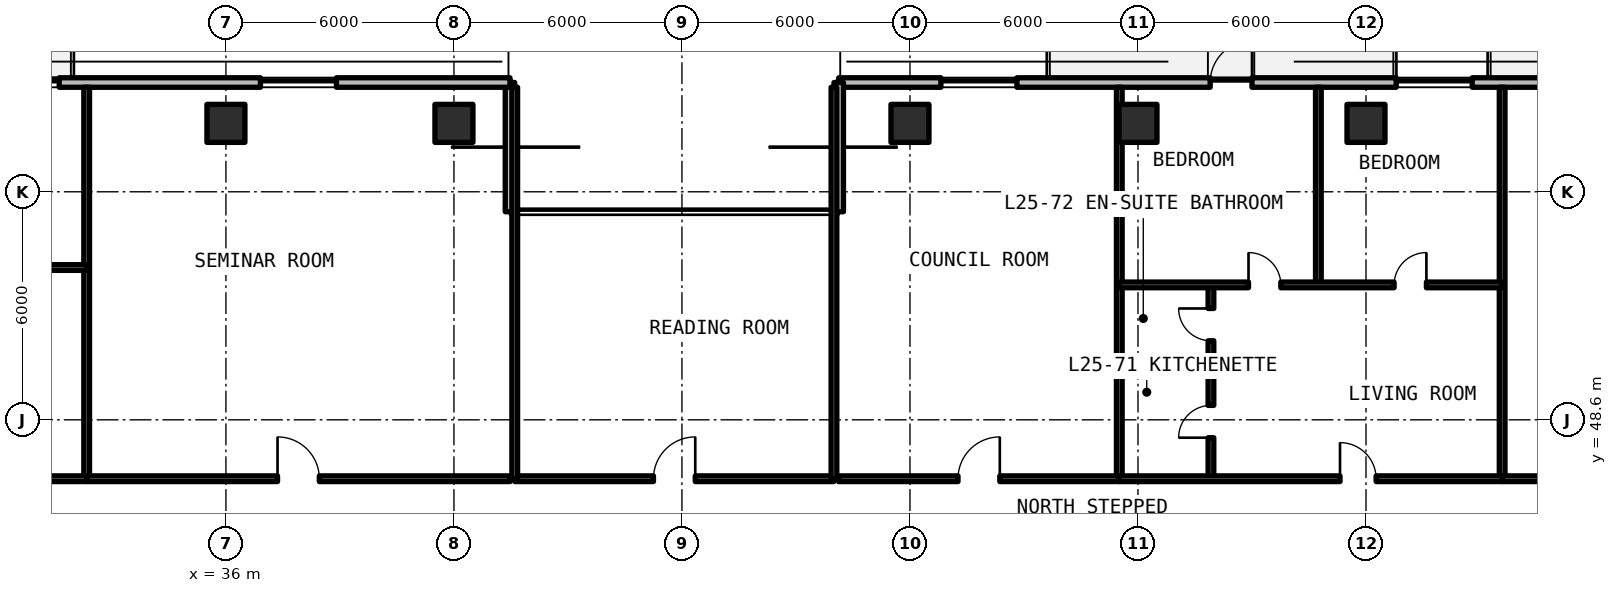
"""IFC4 building model, lengths in metres.
Left out: names, types, materials, properties, quantities, classifications, styles, units other than length and angle.
Written with IfcOpenShell. Run it as: python <this file> out.ifc"""

import sys

from ifc_helpers import new_model, si_unit, direction, frame, frame_2d, origin, origin_2d, place, context, subcontext, project, spatial, rectangle, extrude, element, fill, save


model = new_model("IFC4")
c1 = context("Model", 3, precision=1e-05, world=origin(), true_north=direction((0.0, 1.0)))
c2 = subcontext(c1, "Body", "Model", "MODEL_VIEW")
j1 = project(units=[si_unit("LENGTHUNIT", "METRE"), si_unit("PLANEANGLEUNIT", "RADIAN")], contexts=[c1])
p1 = place(None, origin())
s1 = spatial("IfcSite", under=j1, at=p1, CompositionType="ELEMENT")
p2 = place(p1, origin())
s2 = spatial("IfcBuilding", under=s1, at=p2, CompositionType="ELEMENT")
p3 = place(p2, frame((0.0, 0.0, 92.07)))
s3 = spatial("IfcBuildingStorey", under=s2, at=p3, CompositionType="ELEMENT", Elevation=92.07)
for number, where, z_axis, x_axis in (
    (1, (36.0, 56.4, 0.0), (0.0, 0.0, 1.0), (1.0, 0.0, 0.0)),
    (2, (42.0, 56.4, 0.0), (0.0, 0.0, 1.0), (1.0, 0.0, 0.0)),
    (3, (54.0, 56.4, 0.0), (0.0, 0.0, 1.0), (1.0, 0.0, 0.0)),
    (4, (60.0, 56.4, 0.0), (0.0, 0.0, 1.0), (1.0, 0.0, 0.0)),
    (5, (66.0, 56.4, 0.0), (0.0, 0.0, 1.0), (1.0, 0.0, 0.0)),
):
    element("IfcColumn", number, at=place(p3, frame(where, z_axis=z_axis, x_axis=x_axis)), inside=s3, PredefinedType="COLUMN", context=c2, shape_type="SweptSolid", body=[
        extrude(rectangle(XDim=1.0, YDim=1.0, at=origin_2d()), origin(), (0.0, 0.0, 1.0), 3.3),
    ])
p4 = place(p3, frame((96.148, 57.475, 0.0), z_axis=(0.0, 0.0, 1.0), x_axis=(-1.0, 0.0, 0.0)))
e6 = element("IfcWall", 6, at=p4, inside=s3, PredefinedType="SOLIDWALL", context=c2, shape_type="SweptSolid", body=[
    extrude(rectangle(XDim=44.023, YDim=0.25, at=frame_2d((22.012, 0.0))), origin(), (0.0, 0.0, 1.0), 3.08),
])
p5 = place(p4, frame((33.148, 0.0, 0.0)))
e7 = element("IfcOpeningElement", 7, at=p5, cuts=e6, PredefinedType="OPENING", context=c2, shape_type="SweptSolid", body=[
    extrude(rectangle(XDim=1.1, YDim=2.15, at=frame_2d((0.55, 1.075))), frame((0.0, 0.135, 0.0), z_axis=(0.0, -1.0, 0.0), x_axis=(1.0, 0.0, 0.0)), (0.0, 0.0, 1.0), 0.27),
])
p6 = place(p4, frame((21.298, 0.0, 0.0)))
e8 = element("IfcOpeningElement", 8, at=p6, cuts=e6, PredefinedType="OPENING", context=c2, shape_type="SweptSolid", body=[
    extrude(rectangle(XDim=1.1, YDim=2.15, at=frame_2d((0.55, 1.075))), frame((0.0, 0.135, 0.0), z_axis=(0.0, -1.0, 0.0), x_axis=(1.0, 0.0, 0.0)), (0.0, 0.0, 1.0), 0.27),
])
p7 = place(p4, frame((9.198, 0.0, 0.0)))
e9 = element("IfcOpeningElement", 9, at=p7, cuts=e6, PredefinedType="OPENING", context=c2, shape_type="SweptSolid", body=[
    extrude(rectangle(XDim=1.1, YDim=2.15, at=frame_2d((0.55, 1.075))), frame((0.0, 0.135, 0.0), z_axis=(0.0, -1.0, 0.0), x_axis=(1.0, 0.0, 0.0)), (0.0, 0.0, 1.0), 0.27),
])
p8 = place(p4, frame((39.334, 0.0, 0.78)))
e10 = element("IfcOpeningElement", 10, at=p8, cuts=e6, PredefinedType="OPENING", context=c2, shape_type="SweptSolid", body=[
    extrude(rectangle(XDim=2.0, YDim=1.66, at=frame_2d((1.0, 0.83))), frame((0.0, 0.135, 0.0), z_axis=(0.0, -1.0, 0.0), x_axis=(1.0, 0.0, 0.0)), (0.0, 0.0, 1.0), 0.27),
])
p9 = place(p4, frame((27.354, 0.0, 0.78)))
e11 = element("IfcOpeningElement", 11, at=p9, cuts=e6, PredefinedType="OPENING", context=c2, shape_type="SweptSolid", body=[
    extrude(rectangle(XDim=2.0, YDim=1.66, at=frame_2d((1.0, 0.83))), frame((0.0, 0.135, 0.0), z_axis=(0.0, -1.0, 0.0), x_axis=(1.0, 0.0, 0.0)), (0.0, 0.0, 1.0), 0.27),
])
p10 = place(p4, frame((14.76, 0.0, 0.78)))
e12 = element("IfcOpeningElement", 12, at=p10, cuts=e6, PredefinedType="OPENING", context=c2, shape_type="SweptSolid", body=[
    extrude(rectangle(XDim=2.0, YDim=1.66, at=frame_2d((1.0, 0.83))), frame((0.0, 0.135, 0.0), z_axis=(0.0, -1.0, 0.0), x_axis=(1.0, 0.0, 0.0)), (0.0, 0.0, 1.0), 0.27),
])
p11 = place(p4, frame((3.066, 0.0, 0.78)))
e13 = element("IfcOpeningElement", 13, at=p11, cuts=e6, PredefinedType="OPENING", context=c2, shape_type="SweptSolid", body=[
    extrude(rectangle(XDim=2.0, YDim=1.66, at=frame_2d((1.0, 0.83))), frame((0.0, 0.135, 0.0), z_axis=(0.0, -1.0, 0.0), x_axis=(1.0, 0.0, 0.0)), (0.0, 0.0, 1.0), 0.27),
])
for number, where, z_axis, x_axis in (
    (14, (52.125, 57.475, 0.0), (0.0, 0.0, 1.0), (0.0, -1.0, 0.0)),
    (15, (43.475, 54.075, 0.0), (0.0, 0.0, 1.0), (0.0, 1.0, 0.0)),
):
    element("IfcWall", number, at=place(p3, frame(where, z_axis=z_axis, x_axis=x_axis)), inside=s3, PredefinedType="SOLIDWALL", context=c2, shape_type="SweptSolid", body=[
        extrude(rectangle(XDim=3.4, YDim=0.25, at=frame_2d((1.7, 0.0))), origin(), (0.0, 0.0, 1.0), 3.08),
    ])
p12 = place(p3, frame((43.475, 57.475, 0.0), z_axis=(0.0, 0.0, 1.0), x_axis=(-1.0, 0.0, 0.0)))
e16 = element("IfcWall", 16, at=p12, inside=s3, PredefinedType="SOLIDWALL", context=c2, shape_type="SweptSolid", body=[
    extrude(rectangle(XDim=22.023, YDim=0.25, at=frame_2d((11.012, 0.0))), origin(), (0.0, 0.0, 1.0), 3.08),
])
p13 = place(p12, frame((16.275, 0.0, 0.0)))
e17 = element("IfcOpeningElement", 17, at=p13, cuts=e16, PredefinedType="OPENING", context=c2, shape_type="SweptSolid", body=[
    extrude(rectangle(XDim=1.1, YDim=2.15, at=frame_2d((0.55, 1.075))), frame((0.0, 0.135, 0.0), z_axis=(0.0, -1.0, 0.0), x_axis=(1.0, 0.0, 0.0)), (0.0, 0.0, 1.0), 0.27),
])
p14 = place(p12, frame((11.862, 0.0, 0.78)))
e18 = element("IfcOpeningElement", 18, at=p14, cuts=e16, PredefinedType="OPENING", context=c2, shape_type="SweptSolid", body=[
    extrude(rectangle(XDim=0.85, YDim=1.65, at=frame_2d((0.425, 0.825))), frame((0.0, 0.135, 0.0), z_axis=(0.0, -1.0, 0.0), x_axis=(1.0, 0.0, 0.0)), (0.0, 0.0, 1.0), 0.27),
])
p15 = place(p12, frame((4.567, 0.0, 0.78)))
e19 = element("IfcOpeningElement", 19, at=p15, cuts=e16, PredefinedType="OPENING", context=c2, shape_type="SweptSolid", body=[
    extrude(rectangle(XDim=2.0, YDim=1.66, at=frame_2d((1.0, 0.83))), frame((0.0, 0.135, 0.0), z_axis=(0.0, -1.0, 0.0), x_axis=(1.0, 0.0, 0.0)), (0.0, 0.0, 1.0), 0.27),
])
p16 = place(p3, frame((43.6, 47.05, 0.0), z_axis=(0.0, 0.0, 1.0), x_axis=(1.0, 0.0, 0.0)))
e20 = element("IfcWall", 20, at=p16, inside=s3, PredefinedType="SOLIDWALL", context=c2, shape_type="SweptSolid", body=[
    extrude(rectangle(XDim=8.4, YDim=0.15, at=frame_2d((4.2, 0.0))), origin(), (0.0, 0.0, 1.0), 2.35),
])
p17 = place(p16, frame((3.65, 0.0, 0.0)))
e21 = element("IfcOpeningElement", 21, at=p17, cuts=e20, PredefinedType="OPENING", context=c2, shape_type="SweptSolid", body=[
    extrude(rectangle(XDim=1.1, YDim=2.15, at=frame_2d((0.55, 1.075))), frame((0.0, 0.085, 0.0), z_axis=(0.0, -1.0, 0.0), x_axis=(1.0, 0.0, 0.0)), (0.0, 0.0, 1.0), 0.17),
])
for number, where, z_axis, x_axis in (
    (22, (43.6, 47.05, 0.0), (0.0, 0.0, 1.0), (0.0, 1.0, 0.0)),
    (23, (52.0, 47.05, 0.0), (0.0, 0.0, 1.0), (0.0, 1.0, 0.0)),
    (24, (32.336, 47.05, 0.0), (0.0, 0.0, 1.0), (0.0, 1.0, 0.0)),
):
    element("IfcWall", number, at=place(p3, frame(where, z_axis=z_axis, x_axis=x_axis)), inside=s3, PredefinedType="SOLIDWALL", context=c2, shape_type="SweptSolid", body=[
        extrude(rectangle(XDim=10.3, YDim=0.15, at=frame_2d((5.15, 0.0))), origin(), (0.0, 0.0, 1.0), 2.35),
    ])
p18 = place(p3, frame((21.6, 52.607, 0.0), z_axis=(0.0, 0.0, 1.0), x_axis=(1.0, 0.0, 0.0)))
e25 = element("IfcWall", 25, at=p18, inside=s3, PredefinedType="PARTITIONING", context=c2, shape_type="SweptSolid", body=[
    extrude(rectangle(XDim=10.736, YDim=0.15, at=frame_2d((5.368, 0.0))), origin(), (0.0, 0.0, 1.0), 2.35),
])
p19 = place(p18, frame((4.845, 0.0, 0.0)))
e26 = element("IfcOpeningElement", 26, at=p19, cuts=e25, PredefinedType="OPENING", context=c2, shape_type="SweptSolid", body=[
    extrude(rectangle(XDim=0.85, YDim=2.1, at=frame_2d((0.425, 1.05))), frame((0.0, 0.085, 0.0), z_axis=(0.0, -1.0, 0.0), x_axis=(1.0, 0.0, 0.0)), (0.0, 0.0, 1.0), 0.17),
])
p20 = place(p18, frame((8.053, 0.0, 0.0)))
e27 = element("IfcOpeningElement", 27, at=p20, cuts=e25, PredefinedType="OPENING", context=c2, shape_type="SweptSolid", body=[
    extrude(rectangle(XDim=0.85, YDim=2.1, at=frame_2d((0.425, 1.05))), frame((0.0, 0.085, 0.0), z_axis=(0.0, -1.0, 0.0), x_axis=(1.0, 0.0, 0.0)), (0.0, 0.0, 1.0), 0.17),
])
p21 = place(p3, frame((21.6, 47.05, 0.0), z_axis=(0.0, 0.0, 1.0), x_axis=(1.0, 0.0, 0.0)))
e28 = element("IfcWall", 28, at=p21, inside=s3, PredefinedType="SOLIDWALL", context=c2, shape_type="SweptSolid", body=[
    extrude(rectangle(XDim=10.736, YDim=0.15, at=frame_2d((5.368, 0.0))), origin(), (0.0, 0.0, 1.0), 2.35),
])
p22 = place(p21, frame((7.093, 0.0, 0.0)))
e29 = element("IfcOpeningElement", 29, at=p22, cuts=e28, PredefinedType="OPENING", context=c2, shape_type="SweptSolid", body=[
    extrude(rectangle(XDim=0.95, YDim=2.15, at=frame_2d((0.475, 1.075))), frame((0.0, 0.085, 0.0), z_axis=(0.0, -1.0, 0.0), x_axis=(1.0, 0.0, 0.0)), (0.0, 0.0, 1.0), 0.17),
])
p23 = place(p3, frame((32.336, 47.05, 0.0), z_axis=(0.0, 0.0, 1.0), x_axis=(1.0, 0.0, 0.0)))
e30 = element("IfcWall", 30, at=p23, inside=s3, PredefinedType="SOLIDWALL", context=c2, shape_type="SweptSolid", body=[
    extrude(rectangle(XDim=11.144, YDim=0.15, at=frame_2d((5.572, 0.0))), origin(), (0.0, 0.0, 1.0), 2.35),
])
p24 = place(p23, frame((5.022, 0.0, 0.0)))
e31 = element("IfcOpeningElement", 31, at=p24, cuts=e30, PredefinedType="OPENING", context=c2, shape_type="SweptSolid", body=[
    extrude(rectangle(XDim=1.1, YDim=2.15, at=frame_2d((0.55, 1.075))), frame((0.0, 0.085, 0.0), z_axis=(0.0, -1.0, 0.0), x_axis=(1.0, 0.0, 0.0)), (0.0, 0.0, 1.0), 0.17),
])
p25 = place(p3, frame((59.508, 47.05, 0.0), z_axis=(0.0, 0.0, 1.0), x_axis=(0.0, 1.0, 0.0)))
e32 = element("IfcWall", 32, at=p25, inside=s3, PredefinedType="SOLIDWALL", context=c2, shape_type="SweptSolid", body=[
    extrude(rectangle(XDim=10.3, YDim=0.15, at=frame_2d((5.15, 0.0))), origin(), (0.0, 0.0, 1.0), 2.35),
])
p26 = place(p3, frame((52.12, 47.05, 0.0), z_axis=(0.0, 0.0, 1.0), x_axis=(1.0, 0.0, 0.0)))
e33 = element("IfcWall", 33, at=p26, inside=s3, PredefinedType="SOLIDWALL", context=c2, shape_type="SweptSolid", body=[
    extrude(rectangle(XDim=7.388, YDim=0.15, at=frame_2d((3.694, 0.0))), origin(), (0.0, 0.0, 1.0), 2.35),
])
p27 = place(p26, frame((3.144, 0.0, 0.0)))
e34 = element("IfcOpeningElement", 34, at=p27, cuts=e33, PredefinedType="OPENING", context=c2, shape_type="SweptSolid", body=[
    extrude(rectangle(XDim=1.1, YDim=2.15, at=frame_2d((0.55, 1.075))), frame((0.0, 0.085, 0.0), z_axis=(0.0, -1.0, 0.0), x_axis=(1.0, 0.0, 0.0)), (0.0, 0.0, 1.0), 0.17),
])
p28 = place(p3, frame((69.583, 47.05, 0.0), z_axis=(0.0, 0.0, 1.0), x_axis=(0.0, 1.0, 0.0)))
e35 = element("IfcWall", 35, at=p28, inside=s3, PredefinedType="SOLIDWALL", context=c2, shape_type="SweptSolid", body=[
    extrude(rectangle(XDim=10.3, YDim=0.15, at=frame_2d((5.15, 0.0))), origin(), (0.0, 0.0, 1.0), 2.35),
])
p29 = place(p3, frame((59.508, 50.059, 0.0), z_axis=(0.0, 0.0, 1.0), x_axis=(1.0, 0.0, 0.0)))
e36 = element("IfcWall", 36, at=p29, inside=s3, PredefinedType="PARTITIONING", context=c2, shape_type="SweptSolid", body=[
    extrude(rectangle(XDim=2.412, YDim=0.15, at=frame_2d((1.206, 0.0))), origin(), (0.0, 0.0, 1.0), 2.35),
])
p30 = place(p3, frame((61.92, 47.05, 0.0), z_axis=(0.0, 0.0, 1.0), x_axis=(0.0, 1.0, 0.0)))
e37 = element("IfcWall", 37, at=p30, inside=s3, PredefinedType="PARTITIONING", context=c2, shape_type="SweptSolid", body=[
    extrude(rectangle(XDim=5.1, YDim=0.15, at=frame_2d((2.55, 0.0))), origin(), (0.0, 0.0, 1.0), 2.35),
])
p31 = place(p30, frame((1.08, 0.0, 0.0)))
e38 = element("IfcOpeningElement", 38, at=p31, cuts=e37, PredefinedType="OPENING", context=c2, shape_type="SweptSolid", body=[
    extrude(rectangle(XDim=0.85, YDim=2.1, at=frame_2d((0.425, 1.05))), frame((0.0, 0.085, 0.0), z_axis=(0.0, -1.0, 0.0), x_axis=(1.0, 0.0, 0.0)), (0.0, 0.0, 1.0), 0.17),
])
p32 = place(p30, frame((3.629, 0.0, 0.0)))
e39 = element("IfcOpeningElement", 39, at=p32, cuts=e37, PredefinedType="OPENING", context=c2, shape_type="SweptSolid", body=[
    extrude(rectangle(XDim=0.85, YDim=2.1, at=frame_2d((0.425, 1.05))), frame((0.0, 0.085, 0.0), z_axis=(0.0, -1.0, 0.0), x_axis=(1.0, 0.0, 0.0)), (0.0, 0.0, 1.0), 0.17),
])
p33 = place(p3, frame((64.747, 52.15, 0.0), z_axis=(0.0, 0.0, 1.0), x_axis=(0.0, 1.0, 0.0)))
e40 = element("IfcWall", 40, at=p33, inside=s3, PredefinedType="PARTITIONING", context=c2, shape_type="SweptSolid", body=[
    extrude(rectangle(XDim=5.2, YDim=0.15, at=frame_2d((2.6, 0.0))), origin(), (0.0, 0.0, 1.0), 2.35),
])
p34 = place(p3, frame((59.508, 52.15, 0.0), z_axis=(0.0, 0.0, 1.0), x_axis=(1.0, 0.0, 0.0)))
e41 = element("IfcWall", 41, at=p34, inside=s3, PredefinedType="PARTITIONING", context=c2, shape_type="SweptSolid", body=[
    extrude(rectangle(XDim=10.074, YDim=0.15, at=frame_2d((5.037, 0.0))), origin(), (0.0, 0.0, 1.0), 2.35),
])
p35 = place(p34, frame((3.4, 0.0, 0.0)))
e42 = element("IfcOpeningElement", 42, at=p35, cuts=e41, PredefinedType="OPENING", context=c2, shape_type="SweptSolid", body=[
    extrude(rectangle(XDim=0.85, YDim=2.1, at=frame_2d((0.425, 1.05))), frame((0.0, 0.085, 0.0), z_axis=(0.0, -1.0, 0.0), x_axis=(1.0, 0.0, 0.0)), (0.0, 0.0, 1.0), 0.17),
])
p36 = place(p34, frame((7.232, 0.0, 0.0)))
e43 = element("IfcOpeningElement", 43, at=p36, cuts=e41, PredefinedType="OPENING", context=c2, shape_type="SweptSolid", body=[
    extrude(rectangle(XDim=0.85, YDim=2.1, at=frame_2d((0.425, 1.05))), frame((0.0, 0.085, 0.0), z_axis=(0.0, -1.0, 0.0), x_axis=(1.0, 0.0, 0.0)), (0.0, 0.0, 1.0), 0.17),
])
p37 = place(p3, frame((59.508, 47.05, 0.0), z_axis=(0.0, 0.0, 1.0), x_axis=(1.0, 0.0, 0.0)))
e44 = element("IfcWall", 44, at=p37, inside=s3, PredefinedType="SOLIDWALL", context=c2, shape_type="SweptSolid", body=[
    extrude(rectangle(XDim=10.074, YDim=0.15, at=frame_2d((5.037, 0.0))), origin(), (0.0, 0.0, 1.0), 2.35),
])
p38 = place(p37, frame((5.808, 0.0, 0.0)))
e45 = element("IfcOpeningElement", 45, at=p38, cuts=e44, PredefinedType="OPENING", context=c2, shape_type="SweptSolid", body=[
    extrude(rectangle(XDim=0.95, YDim=2.15, at=frame_2d((0.475, 1.075))), frame((0.0, 0.085, 0.0), z_axis=(0.0, -1.0, 0.0), x_axis=(1.0, 0.0, 0.0)), (0.0, 0.0, 1.0), 0.17),
])
p39 = place(p3, frame((69.583, 47.05, 0.0), z_axis=(0.0, 0.0, 1.0), x_axis=(1.0, 0.0, 0.0)))
e46 = element("IfcWall", 46, at=p39, inside=s3, PredefinedType="SOLIDWALL", context=c2, shape_type="SweptSolid", body=[
    extrude(rectangle(XDim=8.06, YDim=0.15, at=frame_2d((4.03, 0.0))), origin(), (0.0, 0.0, 1.0), 2.35),
])
p40 = place(p39, frame((3.48, 0.0, 0.0)))
e47 = element("IfcOpeningElement", 47, at=p40, cuts=e46, PredefinedType="OPENING", context=c2, shape_type="SweptSolid", body=[
    extrude(rectangle(XDim=1.1, YDim=2.15, at=frame_2d((0.55, 1.075))), frame((0.0, 0.085, 0.0), z_axis=(0.0, -1.0, 0.0), x_axis=(1.0, 0.0, 0.0)), (0.0, 0.0, 1.0), 0.17),
])
p41 = place(p5, frame((1.1, 0.0, 0.0), z_axis=(0.0, 0.0, 1.0), x_axis=(-1.0, 0.0, 0.0)))
e48 = element("IfcDoor", 48, at=p41, inside=s3, OperationType="SINGLE_SWING_RIGHT", PredefinedType="DOOR", context=c2, shape_type="SweptSolid", body=[
    extrude(rectangle(XDim=1.1, YDim=2.15, at=frame_2d((0.55, 1.075))), frame((0.0, 0.025, 0.0), z_axis=(0.0, -1.0, 0.0), x_axis=(1.0, 0.0, 0.0)), (0.0, 0.0, 1.0), 0.05),
])
fill(e7, e48)
p42 = place(p8, origin())
e49 = element("IfcWindow", 49, at=p42, inside=s3, PartitioningType="SINGLE_PANEL", PredefinedType="WINDOW", context=c2, shape_type="SweptSolid", body=[
    extrude(rectangle(XDim=2.0, YDim=1.66, at=frame_2d((1.0, 0.83))), frame((0.0, 0.03, 0.0), z_axis=(0.0, -1.0, 0.0), x_axis=(1.0, 0.0, 0.0)), (0.0, 0.0, 1.0), 0.06),
])
fill(e10, e49)
p43 = place(p9, origin())
e50 = element("IfcWindow", 50, at=p43, inside=s3, PartitioningType="SINGLE_PANEL", PredefinedType="WINDOW", context=c2, shape_type="SweptSolid", body=[
    extrude(rectangle(XDim=2.0, YDim=1.66, at=frame_2d((1.0, 0.83))), frame((0.0, 0.03, 0.0), z_axis=(0.0, -1.0, 0.0), x_axis=(1.0, 0.0, 0.0)), (0.0, 0.0, 1.0), 0.06),
])
fill(e11, e50)
p44 = place(p14, origin())
e51 = element("IfcWindow", 51, at=p44, inside=s3, PartitioningType="SINGLE_PANEL", PredefinedType="WINDOW", context=c2, shape_type="SweptSolid", body=[
    extrude(rectangle(XDim=0.85, YDim=1.65, at=frame_2d((0.425, 0.825))), frame((0.0, 0.03, 0.0), z_axis=(0.0, -1.0, 0.0), x_axis=(1.0, 0.0, 0.0)), (0.0, 0.0, 1.0), 0.06),
])
fill(e18, e51)
p45 = place(p15, origin())
e52 = element("IfcWindow", 52, at=p45, inside=s3, PartitioningType="SINGLE_PANEL", PredefinedType="WINDOW", context=c2, shape_type="SweptSolid", body=[
    extrude(rectangle(XDim=2.0, YDim=1.66, at=frame_2d((1.0, 0.83))), frame((0.0, 0.03, 0.0), z_axis=(0.0, -1.0, 0.0), x_axis=(1.0, 0.0, 0.0)), (0.0, 0.0, 1.0), 0.06),
])
fill(e19, e52)
p46 = place(p17, origin())
e53 = element("IfcDoor", 53, at=p46, inside=s3, OperationType="SINGLE_SWING_RIGHT", PredefinedType="DOOR", context=c2, shape_type="SweptSolid", body=[
    extrude(rectangle(XDim=1.1, YDim=2.15, at=frame_2d((0.55, 1.075))), frame((0.0, 0.025, 0.0), z_axis=(0.0, -1.0, 0.0), x_axis=(1.0, 0.0, 0.0)), (0.0, 0.0, 1.0), 0.05),
])
fill(e21, e53)
p47 = place(p24, origin())
e54 = element("IfcDoor", 54, at=p47, inside=s3, OperationType="SINGLE_SWING_LEFT", PredefinedType="DOOR", context=c2, shape_type="SweptSolid", body=[
    extrude(rectangle(XDim=1.1, YDim=2.15, at=frame_2d((0.55, 1.075))), frame((0.0, 0.025, 0.0), z_axis=(0.0, -1.0, 0.0), x_axis=(1.0, 0.0, 0.0)), (0.0, 0.0, 1.0), 0.05),
])
fill(e31, e54)
p48 = place(p27, origin())
e55 = element("IfcDoor", 55, at=p48, inside=s3, OperationType="SINGLE_SWING_RIGHT", PredefinedType="DOOR", context=c2, shape_type="SweptSolid", body=[
    extrude(rectangle(XDim=1.1, YDim=2.15, at=frame_2d((0.55, 1.075))), frame((0.0, 0.025, 0.0), z_axis=(0.0, -1.0, 0.0), x_axis=(1.0, 0.0, 0.0)), (0.0, 0.0, 1.0), 0.05),
])
fill(e34, e55)
p49 = place(p31, origin())
e56 = element("IfcDoor", 56, at=p49, inside=s3, OperationType="SINGLE_SWING_LEFT", PredefinedType="DOOR", context=c2, shape_type="SweptSolid", body=[
    extrude(rectangle(XDim=0.85, YDim=2.1, at=frame_2d((0.425, 1.05))), frame((0.0, 0.025, 0.0), z_axis=(0.0, -1.0, 0.0), x_axis=(1.0, 0.0, 0.0)), (0.0, 0.0, 1.0), 0.05),
])
fill(e38, e56)
p50 = place(p32, origin())
e57 = element("IfcDoor", 57, at=p50, inside=s3, OperationType="SINGLE_SWING_RIGHT", PredefinedType="DOOR", context=c2, shape_type="SweptSolid", body=[
    extrude(rectangle(XDim=0.85, YDim=2.1, at=frame_2d((0.425, 1.05))), frame((0.0, 0.025, 0.0), z_axis=(0.0, -1.0, 0.0), x_axis=(1.0, 0.0, 0.0)), (0.0, 0.0, 1.0), 0.05),
])
fill(e39, e57)
p51 = place(p35, origin())
e58 = element("IfcDoor", 58, at=p51, inside=s3, OperationType="SINGLE_SWING_LEFT", PredefinedType="DOOR", context=c2, shape_type="SweptSolid", body=[
    extrude(rectangle(XDim=0.85, YDim=2.1, at=frame_2d((0.425, 1.05))), frame((0.0, 0.025, 0.0), z_axis=(0.0, -1.0, 0.0), x_axis=(1.0, 0.0, 0.0)), (0.0, 0.0, 1.0), 0.05),
])
fill(e42, e58)
p52 = place(p36, origin())
e59 = element("IfcDoor", 59, at=p52, inside=s3, OperationType="SINGLE_SWING_RIGHT", PredefinedType="DOOR", context=c2, shape_type="SweptSolid", body=[
    extrude(rectangle(XDim=0.85, YDim=2.1, at=frame_2d((0.425, 1.05))), frame((0.0, 0.025, 0.0), z_axis=(0.0, -1.0, 0.0), x_axis=(1.0, 0.0, 0.0)), (0.0, 0.0, 1.0), 0.05),
])
fill(e43, e59)
p53 = place(p38, origin())
e60 = element("IfcDoor", 60, at=p53, inside=s3, OperationType="SINGLE_SWING_LEFT", PredefinedType="DOOR", context=c2, shape_type="SweptSolid", body=[
    extrude(rectangle(XDim=0.95, YDim=2.15, at=frame_2d((0.475, 1.075))), frame((0.0, 0.025, 0.0), z_axis=(0.0, -1.0, 0.0), x_axis=(1.0, 0.0, 0.0)), (0.0, 0.0, 1.0), 0.05),
])
fill(e45, e60)
save(model, sys.argv[1])
